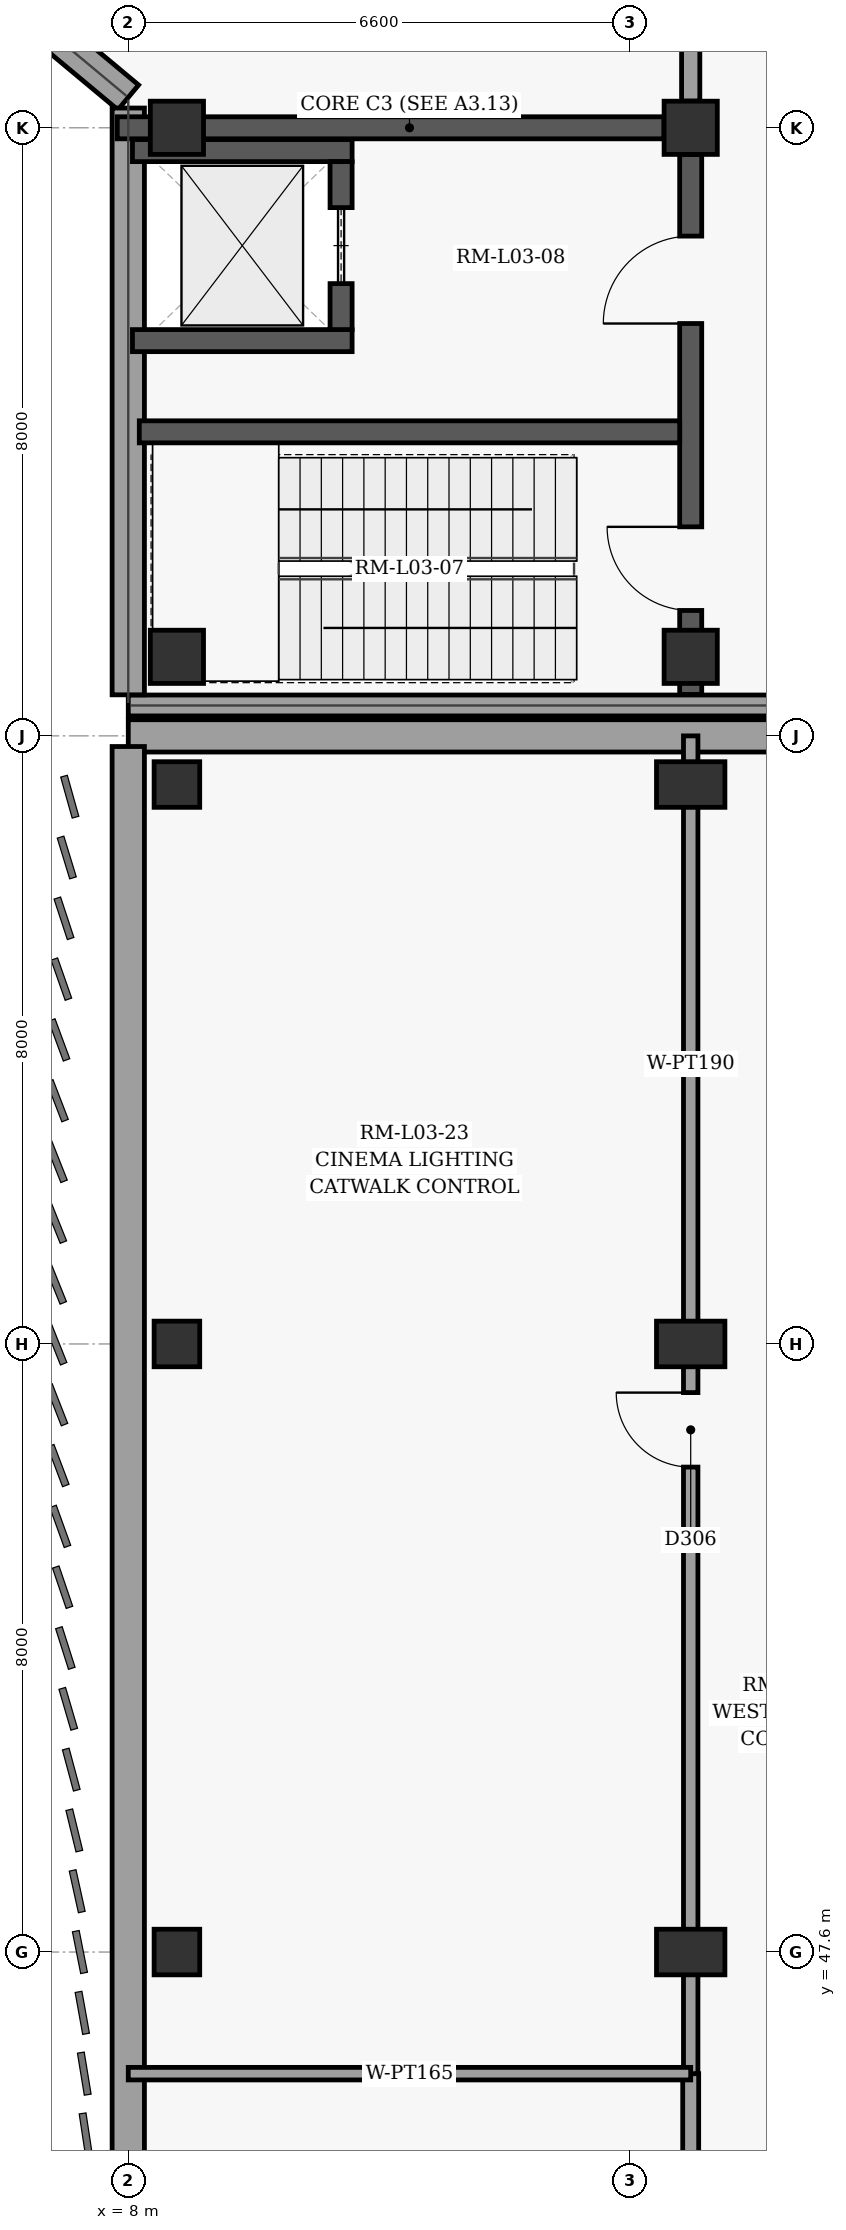
"""IFC4 building model, lengths in metres.
Left out: names, types, materials, properties, quantities, classifications, styles, units other than length and angle.
Written with IfcOpenShell. Run it as: python <this file> out.ifc"""

import sys

from ifc_helpers import new_model, si_unit, direction, frame, frame_2d, origin, origin_2d, place, context, subcontext, project, spatial, rectangle, extrude, element, fill, save


model = new_model("IFC4")
c1 = context("Model", 3, precision=1e-05, world=origin(), true_north=direction((0.0, 1.0)))
c2 = subcontext(c1, "Body", "Model", "MODEL_VIEW")
j1 = project(units=[si_unit("LENGTHUNIT", "METRE"), si_unit("PLANEANGLEUNIT", "RADIAN")], contexts=[c1])
p1 = place(None, origin())
s1 = spatial("IfcSite", under=j1, at=p1, CompositionType="ELEMENT")
p2 = place(p1, origin())
s2 = spatial("IfcBuilding", under=s1, at=p2, CompositionType="ELEMENT")
p3 = place(p2, frame((0.0, 0.0, 15.6)))
s3 = spatial("IfcBuildingStorey", under=s2, at=p3, CompositionType="ELEMENT", Elevation=15.6)
for number, where, z_axis, x_axis in (
    (1, (8.64, 47.6, 0.0), (0.0, 0.0, 1.0), (1.0, 0.0, 0.0)),
    (2, (8.64, 55.6, 0.0), (0.0, 0.0, 1.0), (1.0, 0.0, 0.0)),
    (3, (8.64, 62.96, 0.0), (0.0, 0.0, 1.0), (1.0, 0.0, 0.0)),
):
    element("IfcColumn", number, at=place(p3, frame(where, z_axis=z_axis, x_axis=x_axis)), inside=s3, PredefinedType="COLUMN", context=c2, shape_type="SweptSolid", body=[
        extrude(rectangle(XDim=0.6, YDim=0.6, at=origin_2d()), origin(), (0.0, 0.0, 1.0), 4.8),
    ])
for number, where, z_axis, x_axis in (
    (4, (15.4, 47.6, 0.0), (0.0, 0.0, 1.0), (1.0, 0.0, 0.0)),
    (5, (15.4, 55.6, 0.0), (0.0, 0.0, 1.0), (1.0, 0.0, 0.0)),
    (6, (15.4, 62.96, 0.0), (0.0, 0.0, 1.0), (1.0, 0.0, 0.0)),
):
    element("IfcColumn", number, at=place(p3, frame(where, z_axis=z_axis, x_axis=x_axis)), inside=s3, PredefinedType="COLUMN", context=c2, shape_type="SweptSolid", body=[
        extrude(rectangle(XDim=0.6, YDim=0.9, at=origin_2d()), origin(), (0.0, 0.0, 1.0), 4.8),
    ])
for number, where, z_axis, x_axis in (
    (7, (8.64, 64.64, 0.0), (0.0, 0.0, 1.0), (1.0, 0.0, 0.0)),
    (8, (8.64, 71.6, 0.0), (0.0, 0.0, 1.0), (1.0, 0.0, 0.0)),
    (9, (15.4, 64.64, 0.0), (0.0, 0.0, 1.0), (1.0, 0.0, 0.0)),
    (10, (15.4, 71.6, 0.0), (0.0, 0.0, 1.0), (1.0, 0.0, 0.0)),
):
    element("IfcColumn", number, at=place(p3, frame(where, z_axis=z_axis, x_axis=x_axis)), inside=s3, PredefinedType="COLUMN", context=c2, shape_type="SweptSolid", body=[
        extrude(rectangle(XDim=0.7, YDim=0.7, at=origin_2d()), origin(), (0.0, 0.0, 1.0), 4.8),
    ])
p4 = place(p3, frame((8.0, 63.6, 0.0), z_axis=(0.0, 0.0, 1.0), x_axis=(1.0, 0.0, 0.0)))
e11 = element("IfcWall", 11, at=p4, inside=s3, PredefinedType="SOLIDWALL", context=c2, shape_type="SweptSolid", body=[
    extrude(rectangle(XDim=38.0, YDim=0.425, at=frame_2d((19.0, 0.0))), origin(), (0.0, 0.0, 1.0), 4.555),
])
p5 = place(p3, frame((8.0, 7.74, 0.0), z_axis=(0.0, 0.0, 1.0), x_axis=(0.0, 1.0, 0.0)))
e12 = element("IfcWall", 12, at=p5, inside=s3, PredefinedType="SOLIDWALL", context=c2, shape_type="SweptSolid", body=[
    extrude(rectangle(XDim=55.72, YDim=0.425, at=frame_2d((27.86, 0.0))), origin(), (0.0, 0.0, 1.0), 4.555),
])
p6 = place(p3, frame((8.0, 72.0, 0.0), z_axis=(0.0, 0.0, 1.0), x_axis=(-0.768208468069, 0.640199773186, 0.0)))
e13 = element("IfcWall", 13, at=p6, inside=s3, PredefinedType="SOLIDWALL", context=c2, shape_type="SweptSolid", body=[
    extrude(rectangle(XDim=3.124, YDim=0.425, at=frame_2d((1.562, 0.0))), origin(), (0.0, 0.0, 1.0), 4.55),
])
p7 = place(p3, frame((40.2, 64.0, 0.0), z_axis=(0.0, 0.0, 1.0), x_axis=(-1.0, 0.0, 0.0)))
e14 = element("IfcWall", 14, at=p7, inside=s3, PredefinedType="SOLIDWALL", context=c2, shape_type="SweptSolid", body=[
    extrude(rectangle(XDim=32.2, YDim=0.275, at=frame_2d((16.1, 0.0))), origin(), (0.0, 0.0, 1.0), 4.55),
])
p8 = place(p3, frame((8.0, 64.14, 0.0), z_axis=(0.0, 0.0, 1.0), x_axis=(0.0, 1.0, 0.0)))
e15 = element("IfcWall", 15, at=p8, inside=s3, PredefinedType="SOLIDWALL", context=c2, shape_type="SweptSolid", body=[
    extrude(rectangle(XDim=7.72, YDim=0.425, at=frame_2d((3.86, 0.0))), origin(), (0.0, 0.0, 1.0), 4.55),
])
p9 = place(p3, frame((7.855, 71.6, 0.0), z_axis=(0.0, 0.0, 1.0), x_axis=(1.0, 0.0, 0.0)))
e16 = element("IfcWall", 16, at=p9, inside=s3, PredefinedType="SHEAR", context=c2, shape_type="SweptSolid", body=[
    extrude(rectangle(XDim=7.193, YDim=0.29, at=frame_2d((3.597, 0.0))), origin(), (0.0, 0.0, 1.0), 4.55),
])
p10 = place(p3, frame((15.4, 64.145, 0.0), z_axis=(0.0, 0.0, 1.0), x_axis=(0.0, 1.0, 0.0)))
e17 = element("IfcWall", 17, at=p10, inside=s3, PredefinedType="SHEAR", context=c2, shape_type="SweptSolid", body=[
    extrude(rectangle(XDim=7.103, YDim=0.29, at=frame_2d((3.552, 0.0))), origin(), (0.0, 0.0, 1.0), 4.55),
])
p11 = place(p10, frame((1.105, 0.0, 0.0)))
e18 = element("IfcOpeningElement", 18, at=p11, cuts=e17, PredefinedType="OPENING", context=c2, shape_type="SweptSolid", body=[
    extrude(rectangle(XDim=1.1, YDim=2.15, at=frame_2d((0.55, 1.075))), frame((0.0, 0.155, 0.0), z_axis=(0.0, -1.0, 0.0), x_axis=(1.0, 0.0, 0.0)), (0.0, 0.0, 1.0), 0.31),
])
p12 = place(p10, frame((4.88, 0.0, 0.0)))
e19 = element("IfcOpeningElement", 19, at=p12, cuts=e17, PredefinedType="OPENING", context=c2, shape_type="SweptSolid", body=[
    extrude(rectangle(XDim=1.15, YDim=2.2, at=frame_2d((0.575, 1.1))), frame((0.0, 0.155, 0.0), z_axis=(0.0, -1.0, 0.0), x_axis=(1.0, 0.0, 0.0)), (0.0, 0.0, 1.0), 0.31),
])
p13 = place(p3, frame((8.145, 67.6, 0.0), z_axis=(0.0, 0.0, 1.0), x_axis=(1.0, 0.0, 0.0)))
e20 = element("IfcWall", 20, at=p13, inside=s3, PredefinedType="SHEAR", context=c2, shape_type="SweptSolid", body=[
    extrude(rectangle(XDim=7.11, YDim=0.29, at=frame_2d((3.555, 0.0))), origin(), (0.0, 0.0, 1.0), 4.55),
])
for number, where, z_axis, x_axis in (
    (21, (8.055, 68.8, 0.0), (0.0, 0.0, 1.0), (1.0, 0.0, 0.0)),
    (22, (8.055, 71.3, 0.0), (0.0, 0.0, 1.0), (1.0, 0.0, 0.0)),
):
    element("IfcWall", number, at=place(p3, frame(where, z_axis=z_axis, x_axis=x_axis)), inside=s3, PredefinedType="SHEAR", context=c2, shape_type="SweptSolid", body=[
        extrude(rectangle(XDim=2.89, YDim=0.29, at=frame_2d((1.445, 0.0))), origin(), (0.0, 0.0, 1.0), 4.55),
    ])
p14 = place(p3, frame((10.8, 68.945, 0.0), z_axis=(0.0, 0.0, 1.0), x_axis=(0.0, 1.0, 0.0)))
e23 = element("IfcWall", 23, at=p14, inside=s3, PredefinedType="SHEAR", context=c2, shape_type="SweptSolid", body=[
    extrude(rectangle(XDim=2.21, YDim=0.29, at=frame_2d((1.105, 0.0))), origin(), (0.0, 0.0, 1.0), 4.55),
])
p15 = place(p14, frame((0.605, 0.0, 0.0)))
e24 = element("IfcOpeningElement", 24, at=p15, cuts=e23, PredefinedType="OPENING", context=c2, shape_type="SweptSolid", body=[
    extrude(rectangle(XDim=1.0, YDim=2.15, at=frame_2d((0.5, 1.075))), frame((0.0, 0.155, 0.0), z_axis=(0.0, -1.0, 0.0), x_axis=(1.0, 0.0, 0.0)), (0.0, 0.0, 1.0), 0.31),
])
p16 = place(p3, frame((15.4, 26.4, 0.0), z_axis=(0.0, 0.0, 1.0), x_axis=(0.0, 1.0, 0.0)))
e25 = element("IfcWall", 25, at=p16, inside=s3, PredefinedType="PARTITIONING", context=c2, shape_type="SweptSolid", body=[
    extrude(rectangle(XDim=19.6, YDim=0.21, at=frame_2d((9.8, 0.0))), origin(), (0.0, 0.0, 1.0), 2.732),
])
p17 = place(p16, frame((9.28, 0.0, 0.0)))
e26 = element("IfcOpeningElement", 26, at=p17, cuts=e25, PredefinedType="OPENING", context=c2, shape_type="SweptSolid", body=[
    extrude(rectangle(XDim=1.04, YDim=2.2, at=frame_2d((0.52, 1.1))), frame((0.0, 0.115, 0.0), z_axis=(0.0, -1.0, 0.0), x_axis=(1.0, 0.0, 0.0)), (0.0, 0.0, 1.0), 0.23),
])
p18 = place(p3, frame((15.4, 46.0, 0.0), z_axis=(0.0, 0.0, 1.0), x_axis=(0.0, 1.0, 0.0)))
e27 = element("IfcWall", 27, at=p18, inside=s3, PredefinedType="PARTITIONING", context=c2, shape_type="SweptSolid", body=[
    extrude(rectangle(XDim=17.6, YDim=0.19, at=frame_2d((8.8, 0.0))), origin(), (0.0, 0.0, 1.0), 2.732),
])
p19 = place(p18, frame((7.98, 0.0, 0.0)))
e28 = element("IfcOpeningElement", 28, at=p19, cuts=e27, PredefinedType="OPENING", context=c2, shape_type="SweptSolid", body=[
    extrude(rectangle(XDim=0.98, YDim=2.1, at=frame_2d((0.49, 1.05))), frame((0.0, 0.105, 0.0), z_axis=(0.0, -1.0, 0.0), x_axis=(1.0, 0.0, 0.0)), (0.0, 0.0, 1.0), 0.21),
])
p20 = place(p3, frame((8.0, 46.0, 0.0), z_axis=(0.0, 0.0, 1.0), x_axis=(1.0, 0.0, 0.0)))
e29 = element("IfcWall", 29, at=p20, inside=s3, PredefinedType="PARTITIONING", context=c2, shape_type="SweptSolid", body=[
    extrude(rectangle(XDim=7.4, YDim=0.165, at=frame_2d((3.7, 0.0))), origin(), (0.0, 0.0, 1.0), 4.555),
])
p21 = place(p3, frame((15.4, 71.952, 0.0), z_axis=(0.0, 0.0, 1.0), x_axis=(0.0, 1.0, 0.0)))
e30 = element("IfcWall", 30, at=p21, inside=s3, PredefinedType="PARTITIONING", context=c2, shape_type="SweptSolid", body=[
    extrude(rectangle(XDim=7.296, YDim=0.24, at=frame_2d((3.648, 0.0))), origin(), (0.0, 0.0, 1.0), 3.7),
])
p22 = place(p21, frame((3.108, 0.0, 0.0)))
e31 = element("IfcOpeningElement", 31, at=p22, cuts=e30, PredefinedType="OPENING", context=c2, shape_type="SweptSolid", body=[
    extrude(rectangle(XDim=1.08, YDim=2.15, at=frame_2d((0.54, 1.075))), frame((0.0, 0.13, 0.0), z_axis=(0.0, -1.0, 0.0), x_axis=(1.0, 0.0, 0.0)), (0.0, 0.0, 1.0), 0.26),
])
p23 = place(p11, origin())
e32 = element("IfcDoor", 32, at=p23, inside=s3, OperationType="SINGLE_SWING_RIGHT", PredefinedType="DOOR", context=c2, shape_type="SweptSolid", body=[
    extrude(rectangle(XDim=1.1, YDim=2.15, at=frame_2d((0.55, 1.075))), frame((0.0, 0.025, 0.0), z_axis=(0.0, -1.0, 0.0), x_axis=(1.0, 0.0, 0.0)), (0.0, 0.0, 1.0), 0.05),
])
fill(e18, e32)
p24 = place(p12, origin())
e33 = element("IfcDoor", 33, at=p24, inside=s3, OperationType="SINGLE_SWING_LEFT", PredefinedType="DOOR", context=c2, shape_type="SweptSolid", body=[
    extrude(rectangle(XDim=1.15, YDim=2.2, at=frame_2d((0.575, 1.1))), frame((0.0, 0.025, 0.0), z_axis=(0.0, -1.0, 0.0), x_axis=(1.0, 0.0, 0.0)), (0.0, 0.0, 1.0), 0.05),
])
fill(e19, e33)
p25 = place(p15, origin())
e34 = element("IfcDoor", 34, at=p25, inside=s3, OperationType="SLIDING_TO_LEFT", PredefinedType="DOOR", context=c2, shape_type="SweptSolid", body=[
    extrude(rectangle(XDim=1.0, YDim=2.15, at=frame_2d((0.5, 1.075))), frame((0.0, 0.025, 0.0), z_axis=(0.0, -1.0, 0.0), x_axis=(1.0, 0.0, 0.0)), (0.0, 0.0, 1.0), 0.05),
])
fill(e24, e34)
p26 = place(p19, origin())
e35 = element("IfcDoor", 35, at=p26, inside=s3, OperationType="SINGLE_SWING_RIGHT", PredefinedType="DOOR", context=c2, shape_type="SweptSolid", body=[
    extrude(rectangle(XDim=0.98, YDim=2.1, at=frame_2d((0.49, 1.05))), frame((0.0, 0.025, 0.0), z_axis=(0.0, -1.0, 0.0), x_axis=(1.0, 0.0, 0.0)), (0.0, 0.0, 1.0), 0.05),
])
fill(e28, e35)
save(model, sys.argv[1])
